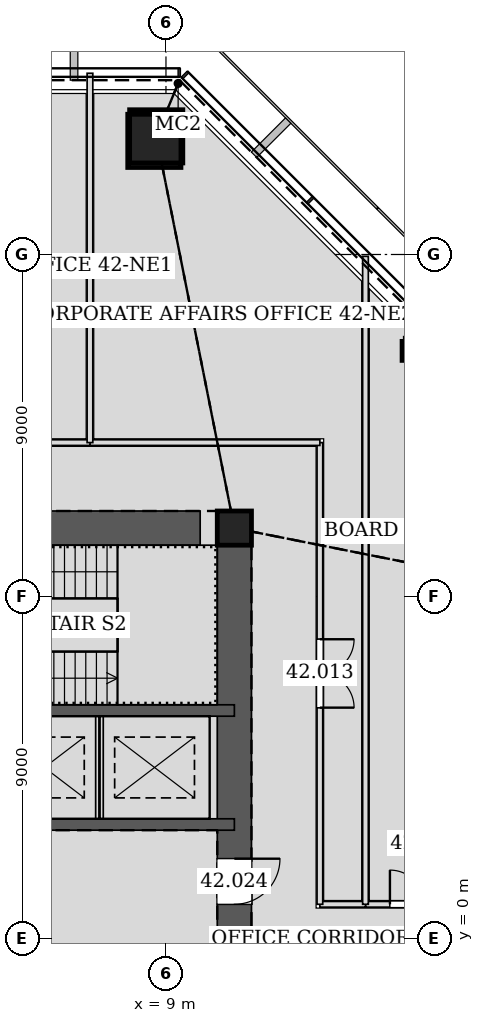
"""IFC4 building model, lengths in metres.
Left out: names, types, materials, properties, quantities, classifications, styles, units other than length and angle.
Written with IfcOpenShell. Run it as: python <this file> out.ifc"""

import sys

from ifc_helpers import new_model, si_unit, direction, frame, frame_2d, origin, origin_2d, place, context, subcontext, project, spatial, rectangle, hollow_rectangle, extrude, element, fill, save


model = new_model("IFC4")
c1 = context("Model", 3, precision=1e-05, world=origin(), true_north=direction((0.0, 1.0)))
c2 = subcontext(c1, "Body", "Model", "MODEL_VIEW")
j1 = project(units=[si_unit("LENGTHUNIT", "METRE"), si_unit("PLANEANGLEUNIT", "RADIAN")], contexts=[c1])
p1 = place(None, origin())
s1 = spatial("IfcSite", under=j1, at=p1, CompositionType="ELEMENT")
p2 = place(p1, origin())
s2 = spatial("IfcBuilding", under=s1, at=p2, CompositionType="ELEMENT")
p3 = place(p2, frame((0.0, 0.0, 184.8)))
s3 = spatial("IfcBuildingStorey", under=s2, at=p3, CompositionType="ELEMENT", Elevation=184.8)
p4 = place(p3, frame((8.744, 21.109, 0.0), z_axis=(-0.011736627314, -0.028295730207, 0.99953069149), x_axis=(0.923693003589, -0.383133442967, 0.0)))
e1 = element("IfcColumn", 1, at=p4, inside=s3, PredefinedType="COLUMN", context=c2, shape_type="SweptSolid", body=[
    extrude(hollow_rectangle(XDim=1.4, YDim=1.4, WallThickness=0.065, at=origin_2d()), origin(), (0.0, 0.0, 1.0), 4.202),
])
p5 = place(p3, frame((15.547, 15.547, 0.0), z_axis=(-0.019988521213, -0.019988521213, 0.999600379171), x_axis=(0.707106781187, -0.707106781187, 0.0)))
e2 = element("IfcColumn", 2, at=p5, inside=s3, PredefinedType="COLUMN", context=c2, shape_type="SweptSolid", body=[
    extrude(hollow_rectangle(XDim=0.5, YDim=0.5, WallThickness=0.025, at=origin_2d()), origin(), (0.0, 0.0, 1.0), 4.202),
])
p6 = place(p3, frame((10.8, 10.8, 0.0), z_axis=(0.0, 0.0, 1.0), x_axis=(1.0, 0.0, 0.0)))
e3 = element("IfcColumn", 3, at=p6, inside=s3, PredefinedType="COLUMN", context=c2, shape_type="SweptSolid", body=[
    extrude(hollow_rectangle(XDim=0.9, YDim=0.9, WallThickness=0.06, at=origin_2d()), origin(), (0.0, 0.0, 1.0), 4.2),
])
p7 = place(p3, frame((10.8, -10.8, 0.0), z_axis=(0.0, 0.0, 1.0), x_axis=(0.0, 1.0, 0.0)))
e4 = element("IfcWall", 4, at=p7, inside=s3, PredefinedType="SOLIDWALL", context=c2, shape_type="SweptSolid", body=[
    extrude(rectangle(XDim=21.6, YDim=0.9, at=frame_2d((10.8, 0.0))), origin(), (0.0, 0.0, 1.0), 4.2),
])
p8 = place(p7, frame((11.7, 0.0, 0.0)))
e5 = element("IfcOpeningElement", 5, at=p8, cuts=e4, PredefinedType="OPENING", context=c2, shape_type="SweptSolid", body=[
    extrude(rectangle(XDim=1.2, YDim=2.1, at=frame_2d((0.6, 1.05))), frame((0.0, 0.46, 0.0), z_axis=(0.0, -1.0, 0.0), x_axis=(1.0, 0.0, 0.0)), (0.0, 0.0, 1.0), 0.92),
])
p9 = place(p7, frame((8.7, 0.0, 0.0)))
e6 = element("IfcOpeningElement", 6, at=p9, cuts=e4, PredefinedType="OPENING", context=c2, shape_type="SweptSolid", body=[
    extrude(rectangle(XDim=1.2, YDim=2.1, at=frame_2d((0.6, 1.05))), frame((0.0, 0.46, 0.0), z_axis=(0.0, -1.0, 0.0), x_axis=(1.0, 0.0, 0.0)), (0.0, 0.0, 1.0), 0.92),
])
p10 = place(p3, frame((10.8, 10.8, 0.0), z_axis=(0.0, 0.0, 1.0), x_axis=(-1.0, 0.0, 0.0)))
e7 = element("IfcWall", 7, at=p10, inside=s3, PredefinedType="SOLIDWALL", context=c2, shape_type="SweptSolid", body=[
    extrude(rectangle(XDim=21.6, YDim=0.9, at=frame_2d((10.8, 0.0))), origin(), (0.0, 0.0, 1.0), 4.2),
])
p11 = place(p10, frame((10.05, 0.0, 0.0)))
e8 = element("IfcOpeningElement", 8, at=p11, cuts=e7, PredefinedType="OPENING", context=c2, shape_type="SweptSolid", body=[
    extrude(rectangle(XDim=1.5, YDim=2.1, at=frame_2d((0.75, 1.05))), frame((0.0, 0.46, 0.0), z_axis=(0.0, -1.0, 0.0), x_axis=(1.0, 0.0, 0.0)), (0.0, 0.0, 1.0), 0.92),
])
p12 = place(p3, frame((-10.8, 3.0, 0.0), z_axis=(0.0, 0.0, 1.0), x_axis=(1.0, 0.0, 0.0)))
e9 = element("IfcWall", 9, at=p12, inside=s3, PredefinedType="SOLIDWALL", context=c2, shape_type="SweptSolid", body=[
    extrude(rectangle(XDim=21.6, YDim=0.3, at=frame_2d((10.8, 0.0))), origin(), (0.0, 0.0, 1.0), 4.2),
])
p13 = place(p12, frame((1.65, 0.0, 0.0)))
e10 = element("IfcOpeningElement", 10, at=p13, cuts=e9, PredefinedType="OPENING", context=c2, shape_type="SweptSolid", body=[
    extrude(rectangle(XDim=0.9, YDim=2.1, at=frame_2d((0.45, 1.05))), frame((0.0, 0.16, 0.0), z_axis=(0.0, -1.0, 0.0), x_axis=(1.0, 0.0, 0.0)), (0.0, 0.0, 1.0), 0.32),
])
p14 = place(p12, frame((4.55, 0.0, 0.0)))
e11 = element("IfcOpeningElement", 11, at=p14, cuts=e9, PredefinedType="OPENING", context=c2, shape_type="SweptSolid", body=[
    extrude(rectangle(XDim=0.9, YDim=2.1, at=frame_2d((0.45, 1.05))), frame((0.0, 0.16, 0.0), z_axis=(0.0, -1.0, 0.0), x_axis=(1.0, 0.0, 0.0)), (0.0, 0.0, 1.0), 0.32),
])
p15 = place(p12, frame((7.4, 0.0, 0.0)))
e12 = element("IfcOpeningElement", 12, at=p15, cuts=e9, PredefinedType="OPENING", context=c2, shape_type="SweptSolid", body=[
    extrude(rectangle(XDim=1.0, YDim=2.1, at=frame_2d((0.5, 1.05))), frame((0.0, 0.16, 0.0), z_axis=(0.0, -1.0, 0.0), x_axis=(1.0, 0.0, 0.0)), (0.0, 0.0, 1.0), 0.32),
])
p16 = place(p12, frame((13.25, 0.0, 0.0)))
e13 = element("IfcOpeningElement", 13, at=p16, cuts=e9, PredefinedType="OPENING", context=c2, shape_type="SweptSolid", body=[
    extrude(rectangle(XDim=0.9, YDim=2.1, at=frame_2d((0.45, 1.05))), frame((0.0, 0.16, 0.0), z_axis=(0.0, -1.0, 0.0), x_axis=(1.0, 0.0, 0.0)), (0.0, 0.0, 1.0), 0.32),
])
p17 = place(p3, frame((-10.8, 6.0, 0.0), z_axis=(0.0, 0.0, 1.0), x_axis=(1.0, 0.0, 0.0)))
e14 = element("IfcWall", 14, at=p17, inside=s3, PredefinedType="SOLIDWALL", context=c2, shape_type="SweptSolid", body=[
    extrude(rectangle(XDim=21.6, YDim=0.3, at=frame_2d((10.8, 0.0))), origin(), (0.0, 0.0, 1.0), 4.2),
])
p18 = place(p17, frame((10.25, 0.0, 0.0)))
e15 = element("IfcOpeningElement", 15, at=p18, cuts=e14, PredefinedType="OPENING", context=c2, shape_type="SweptSolid", body=[
    extrude(rectangle(XDim=1.1, YDim=2.1, at=frame_2d((0.55, 1.05))), frame((0.0, 0.16, 0.0), z_axis=(0.0, -1.0, 0.0), x_axis=(1.0, 0.0, 0.0)), (0.0, 0.0, 1.0), 0.32),
])
p19 = place(p3, frame((17.338, 0.9, 0.0), z_axis=(0.0, 0.0, 1.0), x_axis=(-1.0, 0.0, 0.0)))
e16 = element("IfcWall", 16, at=p19, inside=s3, PredefinedType="PARTITIONING", context=c2, shape_type="SweptSolid", body=[
    extrude(rectangle(XDim=3.089, YDim=0.15, at=frame_2d((1.544, 0.0))), origin(), (0.0, 0.0, 1.0), 3.95),
])
p20 = place(p19, frame((0.645, 0.0, 0.0)))
e17 = element("IfcOpeningElement", 17, at=p20, cuts=e16, PredefinedType="OPENING", context=c2, shape_type="SweptSolid", body=[
    extrude(rectangle(XDim=1.8, YDim=2.4, at=frame_2d((0.9, 1.2))), frame((0.0, 0.085, 0.0), z_axis=(0.0, -1.0, 0.0), x_axis=(1.0, 0.0, 0.0)), (0.0, 0.0, 1.0), 0.17),
])
p21 = place(p3, frame((14.251, 0.9, 0.0), z_axis=(0.0, 0.0, 1.0), x_axis=(-1.0, 0.0, 0.0)))
e18 = element("IfcWall", 18, at=p21, inside=s3, PredefinedType="PARTITIONING", context=c2, shape_type="SweptSolid", body=[
    extrude(rectangle(XDim=1.201, YDim=0.15, at=frame_2d((0.601, 0.0))), origin(), (0.0, 0.0, 1.0), 3.094),
])
p22 = place(p3, frame((13.05, 0.9, 0.0), z_axis=(0.0, 0.0, 1.0), x_axis=(0.0, 1.0, 0.0)))
e19 = element("IfcWall", 19, at=p22, inside=s3, PredefinedType="PARTITIONING", context=c2, shape_type="SweptSolid", body=[
    extrude(rectangle(XDim=12.15, YDim=0.15, at=frame_2d((6.075, 0.0))), origin(), (0.0, 0.0, 1.0), 2.929),
])
p23 = place(p22, frame((5.175, 0.0, 0.0)))
e20 = element("IfcOpeningElement", 20, at=p23, cuts=e19, PredefinedType="OPENING", context=c2, shape_type="SweptSolid", body=[
    extrude(rectangle(XDim=1.8, YDim=2.4, at=frame_2d((0.9, 1.2))), frame((0.0, 0.085, 0.0), z_axis=(0.0, -1.0, 0.0), x_axis=(1.0, 0.0, 0.0)), (0.0, 0.0, 1.0), 0.17),
])
p24 = place(p3, frame((13.05, 13.05, 0.0), z_axis=(0.0, 0.0, 1.0), x_axis=(-1.0, 0.0, 0.0)))
e21 = element("IfcWall", 21, at=p24, inside=s3, PredefinedType="PARTITIONING", context=c2, shape_type="SweptSolid", body=[
    extrude(rectangle(XDim=6.051, YDim=0.15, at=frame_2d((3.025, 0.0))), origin(), (0.0, 0.0, 1.0), 2.929),
])
p25 = place(p3, frame((7.001, 13.05, 0.0), z_axis=(0.0, 0.0, 1.0), x_axis=(-1.0, 0.0, 0.0)))
e22 = element("IfcWall", 22, at=p25, inside=s3, PredefinedType="PARTITIONING", context=c2, shape_type="SweptSolid", body=[
    extrude(rectangle(XDim=6.101, YDim=0.15, at=frame_2d((3.051, 0.0))), origin(), (0.0, 0.0, 1.0), 3.094),
])
p26 = place(p3, frame((14.25, 17.952, 0.0), z_axis=(0.0, 0.0, 1.0), x_axis=(0.0, -1.0, 0.0)))
e23 = element("IfcWall", 23, at=p26, inside=s3, PredefinedType="PARTITIONING", context=c2, shape_type="SweptSolid", body=[
    extrude(rectangle(XDim=17.052, YDim=0.15, at=frame_2d((8.526, 0.0))), origin(), (0.0, 0.0, 1.0), 2.929),
])
p27 = place(p3, frame((7.0, 22.769, 0.0), z_axis=(0.0, 0.0, 1.0), x_axis=(0.0, -1.0, 0.0)))
e24 = element("IfcWall", 24, at=p27, inside=s3, PredefinedType="PARTITIONING", context=c2, shape_type="SweptSolid", body=[
    extrude(rectangle(XDim=9.719, YDim=0.15, at=frame_2d((4.859, 0.0))), origin(), (0.0, 0.0, 1.0), 3.04),
])
p28 = place(p3, frame((7.25, 3.15, 0.0), z_axis=(0.0, 0.0, 1.0), x_axis=(0.0, 1.0, 0.0)))
e25 = element("IfcWall", 25, at=p28, inside=s3, PredefinedType="PARTITIONING", context=c2, shape_type="SweptSolid", body=[
    extrude(rectangle(XDim=2.7, YDim=0.2, at=frame_2d((1.35, 0.0))), origin(), (0.0, 0.0, 1.0), 4.2),
])
p29 = place(p20, frame((1.8, 0.0, 0.0), z_axis=(0.0, 0.0, 1.0), x_axis=(-1.0, 0.0, 0.0)))
e26 = element("IfcDoor", 26, at=p29, inside=s3, OperationType="DOUBLE_DOOR_SINGLE_SWING", PredefinedType="DOOR", context=c2, shape_type="SweptSolid", body=[
    extrude(rectangle(XDim=1.8, YDim=2.4, at=frame_2d((0.9, 1.2))), frame((0.0, 0.025, 0.0), z_axis=(0.0, -1.0, 0.0), x_axis=(1.0, 0.0, 0.0)), (0.0, 0.0, 1.0), 0.05),
])
fill(e17, e26)
p30 = place(p23, frame((1.8, 0.0, 0.0), z_axis=(0.0, 0.0, 1.0), x_axis=(-1.0, 0.0, 0.0)))
e27 = element("IfcDoor", 27, at=p30, inside=s3, OperationType="DOUBLE_DOOR_SINGLE_SWING", PredefinedType="DOOR", context=c2, shape_type="SweptSolid", body=[
    extrude(rectangle(XDim=1.8, YDim=2.4, at=frame_2d((0.9, 1.2))), frame((0.0, 0.025, 0.0), z_axis=(0.0, -1.0, 0.0), x_axis=(1.0, 0.0, 0.0)), (0.0, 0.0, 1.0), 0.05),
])
fill(e20, e27)
p31 = place(p8, frame((1.2, 0.0, 0.0), z_axis=(0.0, 0.0, 1.0), x_axis=(-1.0, 0.0, 0.0)))
e28 = element("IfcDoor", 28, at=p31, inside=s3, OperationType="SINGLE_SWING_LEFT", PredefinedType="DOOR", context=c2, shape_type="SweptSolid", body=[
    extrude(rectangle(XDim=1.2, YDim=2.1, at=frame_2d((0.6, 1.05))), frame((0.0, 0.025, 0.0), z_axis=(0.0, -1.0, 0.0), x_axis=(1.0, 0.0, 0.0)), (0.0, 0.0, 1.0), 0.05),
])
fill(e5, e28)
save(model, sys.argv[1])
